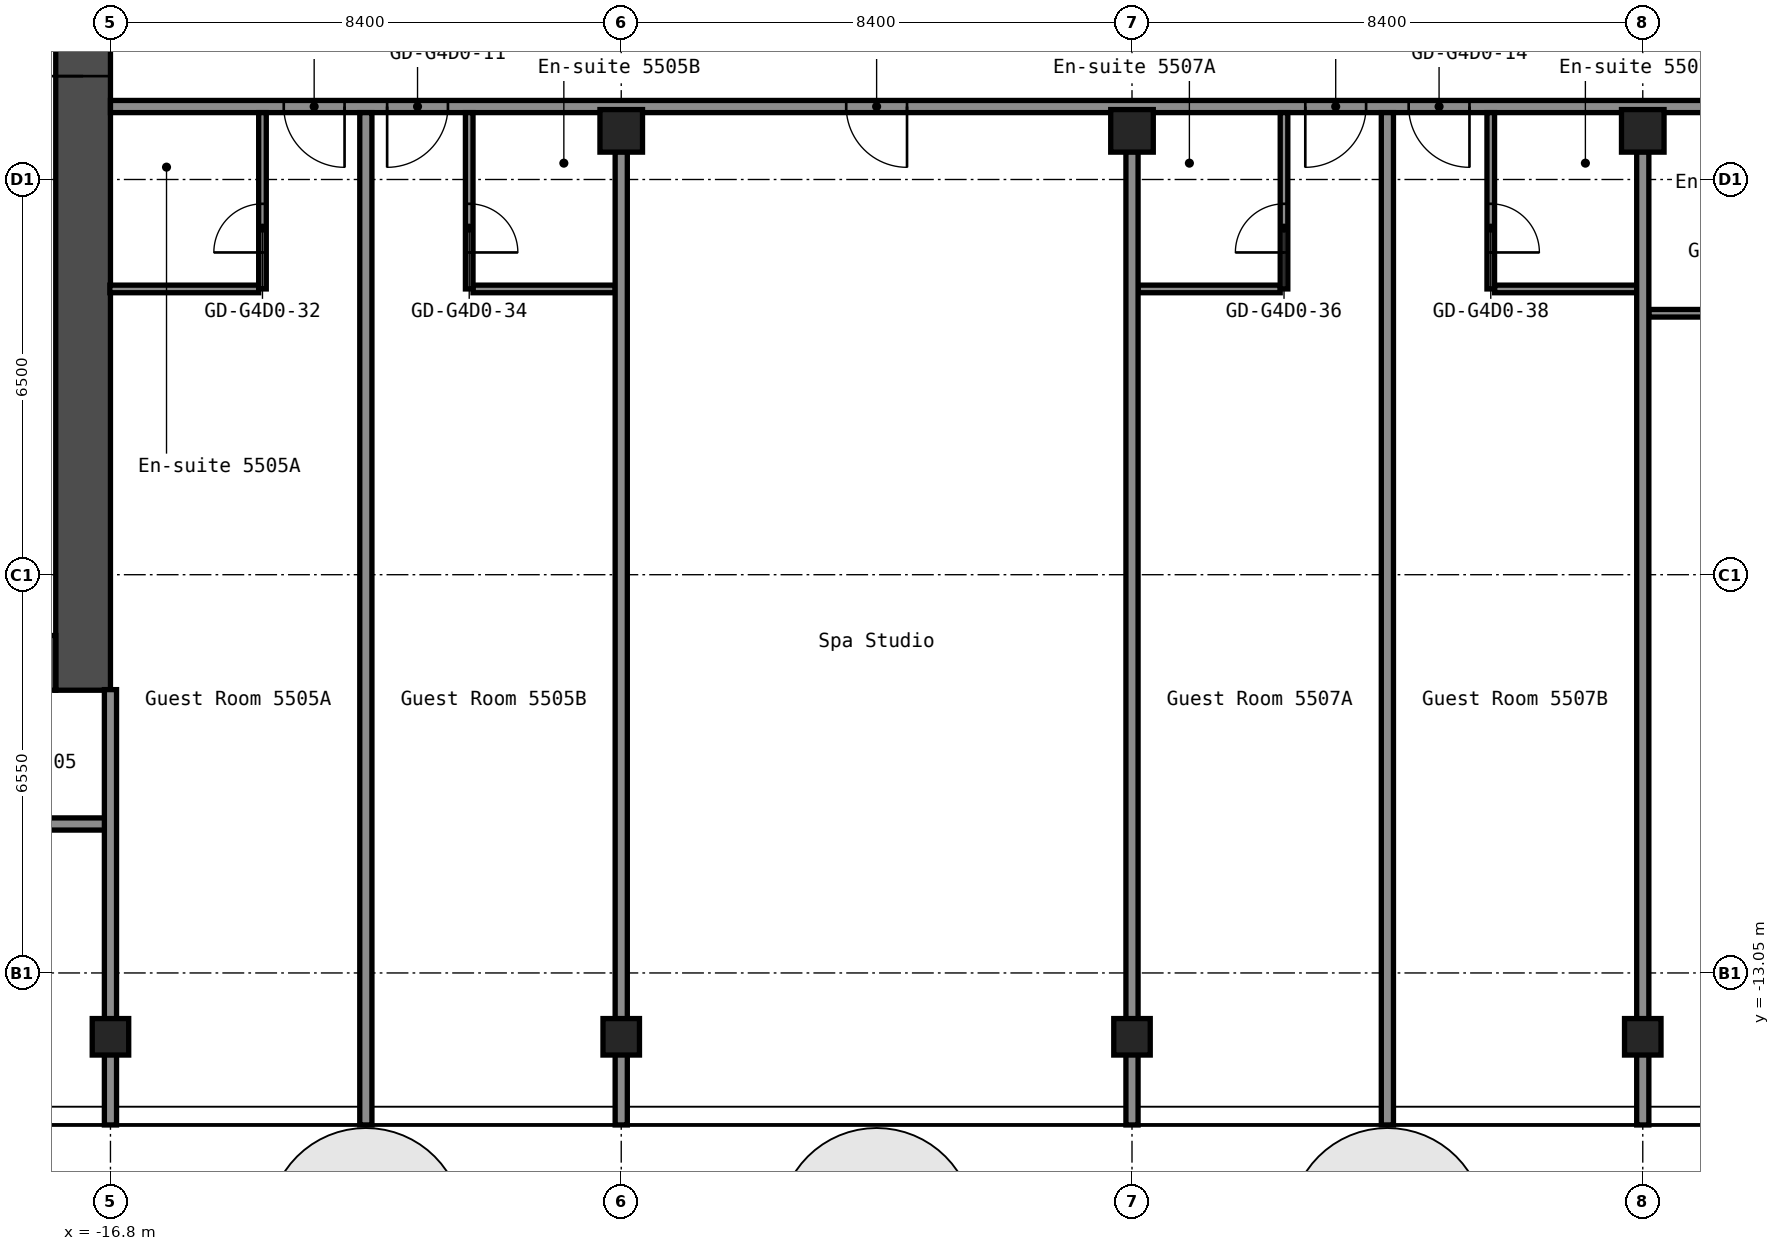
"""IFC4 building model, lengths in metres.
Left out: names, types, materials, properties, quantities, classifications, styles, units other than length and angle.
Written with IfcOpenShell. Run it as: python <this file> out.ifc"""

import sys

from ifc_helpers import new_model, si_unit, direction, frame, frame_2d, origin, origin_2d, place, context, subcontext, project, spatial, rectangle, hollow_rectangle, extrude, element, fill, save


model = new_model("IFC4")
c1 = context("Model", 3, precision=1e-05, world=origin(), true_north=direction((0.0, 1.0)))
c2 = subcontext(c1, "Body", "Model", "MODEL_VIEW")
j1 = project(units=[si_unit("LENGTHUNIT", "METRE"), si_unit("PLANEANGLEUNIT", "RADIAN")], contexts=[c1])
p1 = place(None, origin())
s1 = spatial("IfcSite", under=j1, at=p1, CompositionType="ELEMENT")
p2 = place(p1, origin())
s2 = spatial("IfcBuilding", under=s1, at=p2, CompositionType="ELEMENT")
p3 = place(p2, frame((0.0, 0.0, 196.2)))
s3 = spatial("IfcBuildingStorey", under=s2, at=p3, CompositionType="ELEMENT", Elevation=196.2)
for number, where, z_axis, x_axis in (
    (1, (-16.8, -14.1, 0.0), (0.0, 0.0, 1.0), (1.0, 0.0, 0.0)),
    (2, (-8.4, -14.1, 0.0), (0.0, 0.0, 1.0), (1.0, 0.0, 0.0)),
):
    element("IfcColumn", number, at=place(p3, frame(where, z_axis=z_axis, x_axis=x_axis)), inside=s3, PredefinedType="COLUMN", context=c2, shape_type="SweptSolid", body=[
        extrude(hollow_rectangle(XDim=0.6, YDim=0.6, WallThickness=0.025, InnerFilletRadius=0.038, OuterFilletRadius=0.062, at=origin_2d()), origin(), (0.0, 0.0, 1.0), 2.75),
    ])
p4 = place(p3, frame((-8.4, 0.8, 0.0), z_axis=(0.0, 0.0, 1.0), x_axis=(1.0, 0.0, 0.0)))
e3 = element("IfcColumn", 3, at=p4, inside=s3, PredefinedType="COLUMN", context=c2, shape_type="SweptSolid", body=[
    extrude(hollow_rectangle(XDim=0.7, YDim=0.7, WallThickness=0.028, at=origin_2d()), origin(), (0.0, 0.0, 1.0), 2.75),
])
p5 = place(p3, frame((0.0, -14.1, 0.0), z_axis=(0.0, 0.0, 1.0), x_axis=(1.0, 0.0, 0.0)))
e4 = element("IfcColumn", 4, at=p5, inside=s3, PredefinedType="COLUMN", context=c2, shape_type="SweptSolid", body=[
    extrude(hollow_rectangle(XDim=0.6, YDim=0.6, WallThickness=0.025, InnerFilletRadius=0.038, OuterFilletRadius=0.062, at=origin_2d()), origin(), (0.0, 0.0, 1.0), 2.75),
])
p6 = place(p3, frame((0.0, 0.8, 0.0), z_axis=(0.0, 0.0, 1.0), x_axis=(1.0, 0.0, 0.0)))
e5 = element("IfcColumn", 5, at=p6, inside=s3, PredefinedType="COLUMN", context=c2, shape_type="SweptSolid", body=[
    extrude(hollow_rectangle(XDim=0.7, YDim=0.7, WallThickness=0.028, at=origin_2d()), origin(), (0.0, 0.0, 1.0), 2.75),
])
p7 = place(p3, frame((8.4, -14.1, 0.0), z_axis=(0.0, 0.0, 1.0), x_axis=(1.0, 0.0, 0.0)))
e6 = element("IfcColumn", 6, at=p7, inside=s3, PredefinedType="COLUMN", context=c2, shape_type="SweptSolid", body=[
    extrude(hollow_rectangle(XDim=0.6, YDim=0.6, WallThickness=0.025, InnerFilletRadius=0.038, OuterFilletRadius=0.062, at=origin_2d()), origin(), (0.0, 0.0, 1.0), 2.75),
])
p8 = place(p3, frame((8.4, 0.8, 0.0), z_axis=(0.0, 0.0, 1.0), x_axis=(1.0, 0.0, 0.0)))
e7 = element("IfcColumn", 7, at=p8, inside=s3, PredefinedType="COLUMN", context=c2, shape_type="SweptSolid", body=[
    extrude(hollow_rectangle(XDim=0.7, YDim=0.7, WallThickness=0.028, at=origin_2d()), origin(), (0.0, 0.0, 1.0), 2.75),
])
p9 = place(p3, frame((-17.25, -8.4, 0.0), z_axis=(0.0, 0.0, 1.0), x_axis=(0.0, 1.0, 0.0)))
e8 = element("IfcWall", 8, at=p9, inside=s3, PredefinedType="SHEAR", context=c2, shape_type="SweptSolid", body=[
    extrude(rectangle(XDim=16.8, YDim=0.9, at=frame_2d((8.4, 0.0))), origin(), (0.0, 0.0, 1.0), 2.75),
])
p10 = place(p9, frame((10.1, 0.0, 0.0)))
e9 = element("IfcOpeningElement", 9, at=p10, cuts=e8, PredefinedType="OPENING", context=c2, shape_type="SweptSolid", body=[
    extrude(rectangle(XDim=1.6, YDim=2.1, at=frame_2d((0.8, 1.05))), frame((0.0, 0.46, 0.0), z_axis=(0.0, -1.0, 0.0), x_axis=(1.0, 0.0, 0.0)), (0.0, 0.0, 1.0), 0.92),
])
p11 = place(p3, frame((-32.7, -7.95, 0.0), z_axis=(0.0, 0.0, 1.0), x_axis=(1.0, 0.0, 0.0)))
e10 = element("IfcWall", 10, at=p11, inside=s3, PredefinedType="SHEAR", context=c2, shape_type="SweptSolid", body=[
    extrude(rectangle(XDim=15.0, YDim=0.9, at=frame_2d((7.5, 0.0))), origin(), (0.0, 0.0, 1.0), 2.75),
])
p12 = place(p11, frame((11.45, 0.0, 0.0)))
e11 = element("IfcOpeningElement", 11, at=p12, cuts=e10, PredefinedType="OPENING", context=c2, shape_type="SweptSolid", body=[
    extrude(rectangle(XDim=1.0, YDim=2.1, at=frame_2d((0.5, 1.05))), frame((0.0, 0.46, 0.0), z_axis=(0.0, -1.0, 0.0), x_axis=(1.0, 0.0, 0.0)), (0.0, 0.0, 1.0), 0.92),
])
p13 = place(p3, frame((-38.1, -10.6, 0.0), z_axis=(0.0, 0.0, 1.0), x_axis=(1.0, 0.0, 0.0)))
e12 = element("IfcWall", 12, at=p13, inside=s3, PredefinedType="PARTITIONING", context=c2, shape_type="SweptSolid", body=[
    extrude(rectangle(XDim=21.3, YDim=0.2, at=frame_2d((10.65, 0.0))), origin(), (0.0, 0.0, 1.0), 2.75),
])
p14 = place(p13, frame((1.95, 0.0, 0.0)))
e13 = element("IfcOpeningElement", 13, at=p14, cuts=e12, PredefinedType="OPENING", context=c2, shape_type="SweptSolid", body=[
    extrude(rectangle(XDim=0.9, YDim=2.1, at=frame_2d((0.45, 1.05))), frame((0.0, 0.11, 0.0), z_axis=(0.0, -1.0, 0.0), x_axis=(1.0, 0.0, 0.0)), (0.0, 0.0, 1.0), 0.22),
])
p15 = place(p13, frame((6.4, 0.0, 0.0)))
e14 = element("IfcOpeningElement", 14, at=p15, cuts=e12, PredefinedType="OPENING", context=c2, shape_type="SweptSolid", body=[
    extrude(rectangle(XDim=0.9, YDim=2.1, at=frame_2d((0.45, 1.05))), frame((0.0, 0.11, 0.0), z_axis=(0.0, -1.0, 0.0), x_axis=(1.0, 0.0, 0.0)), (0.0, 0.0, 1.0), 0.22),
])
p16 = place(p13, frame((10.6, 0.0, 0.0)))
e15 = element("IfcOpeningElement", 15, at=p16, cuts=e12, PredefinedType="OPENING", context=c2, shape_type="SweptSolid", body=[
    extrude(rectangle(XDim=0.9, YDim=2.1, at=frame_2d((0.45, 1.05))), frame((0.0, 0.11, 0.0), z_axis=(0.0, -1.0, 0.0), x_axis=(1.0, 0.0, 0.0)), (0.0, 0.0, 1.0), 0.22),
])
p17 = place(p13, frame((15.14, 0.0, 0.0)))
e16 = element("IfcOpeningElement", 16, at=p17, cuts=e12, PredefinedType="OPENING", context=c2, shape_type="SweptSolid", body=[
    extrude(rectangle(XDim=0.9, YDim=2.1, at=frame_2d((0.45, 1.05))), frame((0.0, 0.11, 0.0), z_axis=(0.0, -1.0, 0.0), x_axis=(1.0, 0.0, 0.0)), (0.0, 0.0, 1.0), 0.22),
])
p18 = place(p13, frame((19.34, 0.0, 0.0)))
e17 = element("IfcOpeningElement", 17, at=p18, cuts=e12, PredefinedType="OPENING", context=c2, shape_type="SweptSolid", body=[
    extrude(rectangle(XDim=0.9, YDim=2.1, at=frame_2d((0.45, 1.05))), frame((0.0, 0.11, 0.0), z_axis=(0.0, -1.0, 0.0), x_axis=(1.0, 0.0, 0.0)), (0.0, 0.0, 1.0), 0.22),
])
p19 = place(p3, frame((8.5, -2.2, 0.0), z_axis=(0.0, 0.0, 1.0), x_axis=(1.0, 0.0, 0.0)))
e18 = element("IfcWall", 18, at=p19, inside=s3, PredefinedType="PARTITIONING", context=c2, shape_type="SweptSolid", body=[
    extrude(rectangle(XDim=3.238, YDim=0.125, at=frame_2d((1.619, 0.0))), origin(), (0.0, 0.0, 1.0), 2.75),
])
p20 = place(p19, frame((1.2, 0.0, 0.0)))
e19 = element("IfcOpeningElement", 19, at=p20, cuts=e18, PredefinedType="OPENING", context=c2, shape_type="SweptSolid", body=[
    extrude(rectangle(XDim=0.8, YDim=2.1, at=frame_2d((0.4, 1.05))), frame((0.0, 0.073, 0.0), z_axis=(0.0, -1.0, 0.0), x_axis=(1.0, 0.0, 0.0)), (0.0, 0.0, 1.0), 0.145),
])
p21 = place(p3, frame((-16.81, -1.8, 0.0), z_axis=(0.0, 0.0, 1.0), x_axis=(1.0, 0.0, 0.0)))
e20 = element("IfcWall", 20, at=p21, inside=s3, PredefinedType="PARTITIONING", context=c2, shape_type="SweptSolid", body=[
    extrude(rectangle(XDim=2.448, YDim=0.125, at=frame_2d((1.224, 0.0))), origin(), (0.0, 0.0, 1.0), 2.75),
])
for number, where, z_axis, x_axis in (
    (21, (-10.837, -1.8, 0.0), (0.0, 0.0, 1.0), (1.0, 0.0, 0.0)),
    (22, (0.1, -1.8, 0.0), (0.0, 0.0, 1.0), (1.0, 0.0, 0.0)),
):
    element("IfcWall", number, at=place(p3, frame(where, z_axis=z_axis, x_axis=x_axis)), inside=s3, PredefinedType="PARTITIONING", context=c2, shape_type="SweptSolid", body=[
        extrude(rectangle(XDim=2.337, YDim=0.125, at=frame_2d((1.169, 0.0))), origin(), (0.0, 0.0, 1.0), 2.75),
    ])
p22 = place(p3, frame((5.962, -1.8, 0.0), z_axis=(0.0, 0.0, 1.0), x_axis=(1.0, 0.0, 0.0)))
e23 = element("IfcWall", 23, at=p22, inside=s3, PredefinedType="PARTITIONING", context=c2, shape_type="SweptSolid", body=[
    extrude(rectangle(XDim=2.338, YDim=0.125, at=frame_2d((1.169, 0.0))), origin(), (0.0, 0.0, 1.0), 2.75),
])
p23 = place(p3, frame((-16.8, 1.2, 0.0), z_axis=(0.0, 0.0, 1.0), x_axis=(1.0, 0.0, 0.0)))
e24 = element("IfcWall", 24, at=p23, inside=s3, PredefinedType="PARTITIONING", context=c2, shape_type="SweptSolid", body=[
    extrude(rectangle(XDim=33.6, YDim=0.2, at=frame_2d((16.8, 0.0))), origin(), (0.0, 0.0, 1.0), 2.75),
])
p24 = place(p23, frame((2.85, 0.0, 0.0)))
e25 = element("IfcOpeningElement", 25, at=p24, cuts=e24, PredefinedType="OPENING", context=c2, shape_type="SweptSolid", body=[
    extrude(rectangle(XDim=1.0, YDim=2.1, at=frame_2d((0.5, 1.05))), frame((0.0, 0.11, 0.0), z_axis=(0.0, -1.0, 0.0), x_axis=(1.0, 0.0, 0.0)), (0.0, 0.0, 1.0), 0.22),
])
p25 = place(p23, frame((4.55, 0.0, 0.0)))
e26 = element("IfcOpeningElement", 26, at=p25, cuts=e24, PredefinedType="OPENING", context=c2, shape_type="SweptSolid", body=[
    extrude(rectangle(XDim=1.0, YDim=2.1, at=frame_2d((0.5, 1.05))), frame((0.0, 0.11, 0.0), z_axis=(0.0, -1.0, 0.0), x_axis=(1.0, 0.0, 0.0)), (0.0, 0.0, 1.0), 0.22),
])
p26 = place(p23, frame((12.1, 0.0, 0.0)))
e27 = element("IfcOpeningElement", 27, at=p26, cuts=e24, PredefinedType="OPENING", context=c2, shape_type="SweptSolid", body=[
    extrude(rectangle(XDim=1.0, YDim=2.1, at=frame_2d((0.5, 1.05))), frame((0.0, 0.11, 0.0), z_axis=(0.0, -1.0, 0.0), x_axis=(1.0, 0.0, 0.0)), (0.0, 0.0, 1.0), 0.22),
])
p27 = place(p23, frame((19.65, 0.0, 0.0)))
e28 = element("IfcOpeningElement", 28, at=p27, cuts=e24, PredefinedType="OPENING", context=c2, shape_type="SweptSolid", body=[
    extrude(rectangle(XDim=1.0, YDim=2.1, at=frame_2d((0.5, 1.05))), frame((0.0, 0.11, 0.0), z_axis=(0.0, -1.0, 0.0), x_axis=(1.0, 0.0, 0.0)), (0.0, 0.0, 1.0), 0.22),
])
p28 = place(p23, frame((21.35, 0.0, 0.0)))
e29 = element("IfcOpeningElement", 29, at=p28, cuts=e24, PredefinedType="OPENING", context=c2, shape_type="SweptSolid", body=[
    extrude(rectangle(XDim=1.0, YDim=2.1, at=frame_2d((0.5, 1.05))), frame((0.0, 0.11, 0.0), z_axis=(0.0, -1.0, 0.0), x_axis=(1.0, 0.0, 0.0)), (0.0, 0.0, 1.0), 0.22),
])
p29 = place(p23, frame((30.6, 0.0, 0.0)))
e30 = element("IfcOpeningElement", 30, at=p29, cuts=e24, PredefinedType="OPENING", context=c2, shape_type="SweptSolid", body=[
    extrude(rectangle(XDim=1.0, YDim=2.1, at=frame_2d((0.5, 1.05))), frame((0.0, 0.11, 0.0), z_axis=(0.0, -1.0, 0.0), x_axis=(1.0, 0.0, 0.0)), (0.0, 0.0, 1.0), 0.22),
])
p30 = place(p3, frame((-16.8, -15.55, 0.0), z_axis=(0.0, 0.0, 1.0), x_axis=(0.0, 1.0, 0.0)))
e31 = element("IfcWall", 31, at=p30, inside=s3, PredefinedType="PARTITIONING", context=c2, shape_type="SweptSolid", body=[
    extrude(rectangle(XDim=7.16, YDim=0.2, at=frame_2d((3.58, 0.0))), origin(), (0.0, 0.0, 1.0), 2.75),
])
p31 = place(p3, frame((-14.3, -1.8, 0.0), z_axis=(0.0, 0.0, 1.0), x_axis=(0.0, 1.0, 0.0)))
e32 = element("IfcWall", 32, at=p31, inside=s3, PredefinedType="PARTITIONING", context=c2, shape_type="SweptSolid", body=[
    extrude(rectangle(XDim=2.9, YDim=0.125, at=frame_2d((1.45, 0.0))), origin(), (0.0, 0.0, 1.0), 2.75),
])
p32 = place(p31, frame((0.6, 0.0, 0.0)))
e33 = element("IfcOpeningElement", 33, at=p32, cuts=e32, PredefinedType="OPENING", context=c2, shape_type="SweptSolid", body=[
    extrude(rectangle(XDim=0.8, YDim=2.1, at=frame_2d((0.4, 1.05))), frame((0.0, 0.073, 0.0), z_axis=(0.0, -1.0, 0.0), x_axis=(1.0, 0.0, 0.0)), (0.0, 0.0, 1.0), 0.145),
])
p33 = place(p3, frame((-12.6, -15.55, 0.0), z_axis=(0.0, 0.0, 1.0), x_axis=(0.0, 1.0, 0.0)))
e34 = element("IfcWall", 34, at=p33, inside=s3, PredefinedType="PARTITIONING", context=c2, shape_type="SweptSolid", body=[
    extrude(rectangle(XDim=16.65, YDim=0.2, at=frame_2d((8.325, 0.0))), origin(), (0.0, 0.0, 1.0), 2.75),
])
p34 = place(p3, frame((-10.9, -1.8, 0.0), z_axis=(0.0, 0.0, 1.0), x_axis=(0.0, 1.0, 0.0)))
e35 = element("IfcWall", 35, at=p34, inside=s3, PredefinedType="PARTITIONING", context=c2, shape_type="SweptSolid", body=[
    extrude(rectangle(XDim=2.9, YDim=0.125, at=frame_2d((1.45, 0.0))), origin(), (0.0, 0.0, 1.0), 2.75),
])
p35 = place(p34, frame((0.6, 0.0, 0.0)))
e36 = element("IfcOpeningElement", 36, at=p35, cuts=e35, PredefinedType="OPENING", context=c2, shape_type="SweptSolid", body=[
    extrude(rectangle(XDim=0.8, YDim=2.1, at=frame_2d((0.4, 1.05))), frame((0.0, 0.073, 0.0), z_axis=(0.0, -1.0, 0.0), x_axis=(1.0, 0.0, 0.0)), (0.0, 0.0, 1.0), 0.145),
])
for number, where, z_axis, x_axis in (
    (37, (-8.4, -15.55, 0.0), (0.0, 0.0, 1.0), (0.0, 1.0, 0.0)),
    (38, (0.0, -15.55, 0.0), (0.0, 0.0, 1.0), (0.0, 1.0, 0.0)),
):
    element("IfcWall", number, at=place(p3, frame(where, z_axis=z_axis, x_axis=x_axis)), inside=s3, PredefinedType="PARTITIONING", context=c2, shape_type="SweptSolid", body=[
        extrude(rectangle(XDim=16.01, YDim=0.2, at=frame_2d((8.005, 0.0))), origin(), (0.0, 0.0, 1.0), 2.75),
    ])
p36 = place(p3, frame((2.5, -1.8, 0.0), z_axis=(0.0, 0.0, 1.0), x_axis=(0.0, 1.0, 0.0)))
e39 = element("IfcWall", 39, at=p36, inside=s3, PredefinedType="PARTITIONING", context=c2, shape_type="SweptSolid", body=[
    extrude(rectangle(XDim=2.9, YDim=0.125, at=frame_2d((1.45, 0.0))), origin(), (0.0, 0.0, 1.0), 2.75),
])
p37 = place(p36, frame((0.6, 0.0, 0.0)))
e40 = element("IfcOpeningElement", 40, at=p37, cuts=e39, PredefinedType="OPENING", context=c2, shape_type="SweptSolid", body=[
    extrude(rectangle(XDim=0.8, YDim=2.1, at=frame_2d((0.4, 1.05))), frame((0.0, 0.073, 0.0), z_axis=(0.0, -1.0, 0.0), x_axis=(1.0, 0.0, 0.0)), (0.0, 0.0, 1.0), 0.145),
])
p38 = place(p3, frame((4.2, -15.55, 0.0), z_axis=(0.0, 0.0, 1.0), x_axis=(0.0, 1.0, 0.0)))
e41 = element("IfcWall", 41, at=p38, inside=s3, PredefinedType="PARTITIONING", context=c2, shape_type="SweptSolid", body=[
    extrude(rectangle(XDim=16.65, YDim=0.2, at=frame_2d((8.325, 0.0))), origin(), (0.0, 0.0, 1.0), 2.75),
])
p39 = place(p3, frame((5.9, -1.8, 0.0), z_axis=(0.0, 0.0, 1.0), x_axis=(0.0, 1.0, 0.0)))
e42 = element("IfcWall", 42, at=p39, inside=s3, PredefinedType="PARTITIONING", context=c2, shape_type="SweptSolid", body=[
    extrude(rectangle(XDim=2.9, YDim=0.125, at=frame_2d((1.45, 0.0))), origin(), (0.0, 0.0, 1.0), 2.75),
])
p40 = place(p39, frame((0.6, 0.0, 0.0)))
e43 = element("IfcOpeningElement", 43, at=p40, cuts=e42, PredefinedType="OPENING", context=c2, shape_type="SweptSolid", body=[
    extrude(rectangle(XDim=0.8, YDim=2.1, at=frame_2d((0.4, 1.05))), frame((0.0, 0.073, 0.0), z_axis=(0.0, -1.0, 0.0), x_axis=(1.0, 0.0, 0.0)), (0.0, 0.0, 1.0), 0.145),
])
p41 = place(p3, frame((8.4, -15.55, 0.0), z_axis=(0.0, 0.0, 1.0), x_axis=(0.0, 1.0, 0.0)))
e44 = element("IfcWall", 44, at=p41, inside=s3, PredefinedType="PARTITIONING", context=c2, shape_type="SweptSolid", body=[
    extrude(rectangle(XDim=16.01, YDim=0.2, at=frame_2d((8.005, 0.0))), origin(), (0.0, 0.0, 1.0), 2.75),
])
p42 = place(p10, origin())
e45 = element("IfcDoor", 45, at=p42, inside=s3, OperationType="DOUBLE_DOOR_SINGLE_SWING", PredefinedType="DOOR", context=c2, shape_type="SweptSolid", body=[
    extrude(rectangle(XDim=1.6, YDim=2.1, at=frame_2d((0.8, 1.05))), frame((0.0, 0.025, 0.0), z_axis=(0.0, -1.0, 0.0), x_axis=(1.0, 0.0, 0.0)), (0.0, 0.0, 1.0), 0.05),
])
fill(e9, e45)
p43 = place(p24, origin())
e46 = element("IfcDoor", 46, at=p43, inside=s3, OperationType="SINGLE_SWING_RIGHT", PredefinedType="DOOR", context=c2, shape_type="SweptSolid", body=[
    extrude(rectangle(XDim=1.0, YDim=2.1, at=frame_2d((0.5, 1.05))), frame((0.0, 0.025, 0.0), z_axis=(0.0, -1.0, 0.0), x_axis=(1.0, 0.0, 0.0)), (0.0, 0.0, 1.0), 0.05),
])
fill(e25, e46)
p44 = place(p25, origin())
e47 = element("IfcDoor", 47, at=p44, inside=s3, OperationType="SINGLE_SWING_LEFT", PredefinedType="DOOR", context=c2, shape_type="SweptSolid", body=[
    extrude(rectangle(XDim=1.0, YDim=2.1, at=frame_2d((0.5, 1.05))), frame((0.0, 0.025, 0.0), z_axis=(0.0, -1.0, 0.0), x_axis=(1.0, 0.0, 0.0)), (0.0, 0.0, 1.0), 0.05),
])
fill(e26, e47)
p45 = place(p26, origin())
e48 = element("IfcDoor", 48, at=p45, inside=s3, OperationType="SINGLE_SWING_RIGHT", PredefinedType="DOOR", context=c2, shape_type="SweptSolid", body=[
    extrude(rectangle(XDim=1.0, YDim=2.1, at=frame_2d((0.5, 1.05))), frame((0.0, 0.025, 0.0), z_axis=(0.0, -1.0, 0.0), x_axis=(1.0, 0.0, 0.0)), (0.0, 0.0, 1.0), 0.05),
])
fill(e27, e48)
p46 = place(p27, origin())
e49 = element("IfcDoor", 49, at=p46, inside=s3, OperationType="SINGLE_SWING_LEFT", PredefinedType="DOOR", context=c2, shape_type="SweptSolid", body=[
    extrude(rectangle(XDim=1.0, YDim=2.1, at=frame_2d((0.5, 1.05))), frame((0.0, 0.025, 0.0), z_axis=(0.0, -1.0, 0.0), x_axis=(1.0, 0.0, 0.0)), (0.0, 0.0, 1.0), 0.05),
])
fill(e28, e49)
p47 = place(p28, origin())
e50 = element("IfcDoor", 50, at=p47, inside=s3, OperationType="SINGLE_SWING_RIGHT", PredefinedType="DOOR", context=c2, shape_type="SweptSolid", body=[
    extrude(rectangle(XDim=1.0, YDim=2.1, at=frame_2d((0.5, 1.05))), frame((0.0, 0.025, 0.0), z_axis=(0.0, -1.0, 0.0), x_axis=(1.0, 0.0, 0.0)), (0.0, 0.0, 1.0), 0.05),
])
fill(e29, e50)
p48 = place(p32, origin())
e51 = element("IfcDoor", 51, at=p48, inside=s3, OperationType="SINGLE_SWING_RIGHT", PredefinedType="DOOR", context=c2, shape_type="SweptSolid", body=[
    extrude(rectangle(XDim=0.8, YDim=2.1, at=frame_2d((0.4, 1.05))), frame((0.0, 0.025, 0.0), z_axis=(0.0, -1.0, 0.0), x_axis=(1.0, 0.0, 0.0)), (0.0, 0.0, 1.0), 0.05),
])
fill(e33, e51)
p49 = place(p35, origin())
e52 = element("IfcDoor", 52, at=p49, inside=s3, OperationType="SINGLE_SWING_LEFT", PredefinedType="DOOR", context=c2, shape_type="SweptSolid", body=[
    extrude(rectangle(XDim=0.8, YDim=2.1, at=frame_2d((0.4, 1.05))), frame((0.0, 0.025, 0.0), z_axis=(0.0, -1.0, 0.0), x_axis=(1.0, 0.0, 0.0)), (0.0, 0.0, 1.0), 0.05),
])
fill(e36, e52)
p50 = place(p37, origin())
e53 = element("IfcDoor", 53, at=p50, inside=s3, OperationType="SINGLE_SWING_RIGHT", PredefinedType="DOOR", context=c2, shape_type="SweptSolid", body=[
    extrude(rectangle(XDim=0.8, YDim=2.1, at=frame_2d((0.4, 1.05))), frame((0.0, 0.025, 0.0), z_axis=(0.0, -1.0, 0.0), x_axis=(1.0, 0.0, 0.0)), (0.0, 0.0, 1.0), 0.05),
])
fill(e40, e53)
p51 = place(p40, origin())
e54 = element("IfcDoor", 54, at=p51, inside=s3, OperationType="SINGLE_SWING_LEFT", PredefinedType="DOOR", context=c2, shape_type="SweptSolid", body=[
    extrude(rectangle(XDim=0.8, YDim=2.1, at=frame_2d((0.4, 1.05))), frame((0.0, 0.025, 0.0), z_axis=(0.0, -1.0, 0.0), x_axis=(1.0, 0.0, 0.0)), (0.0, 0.0, 1.0), 0.05),
])
fill(e43, e54)
save(model, sys.argv[1])
